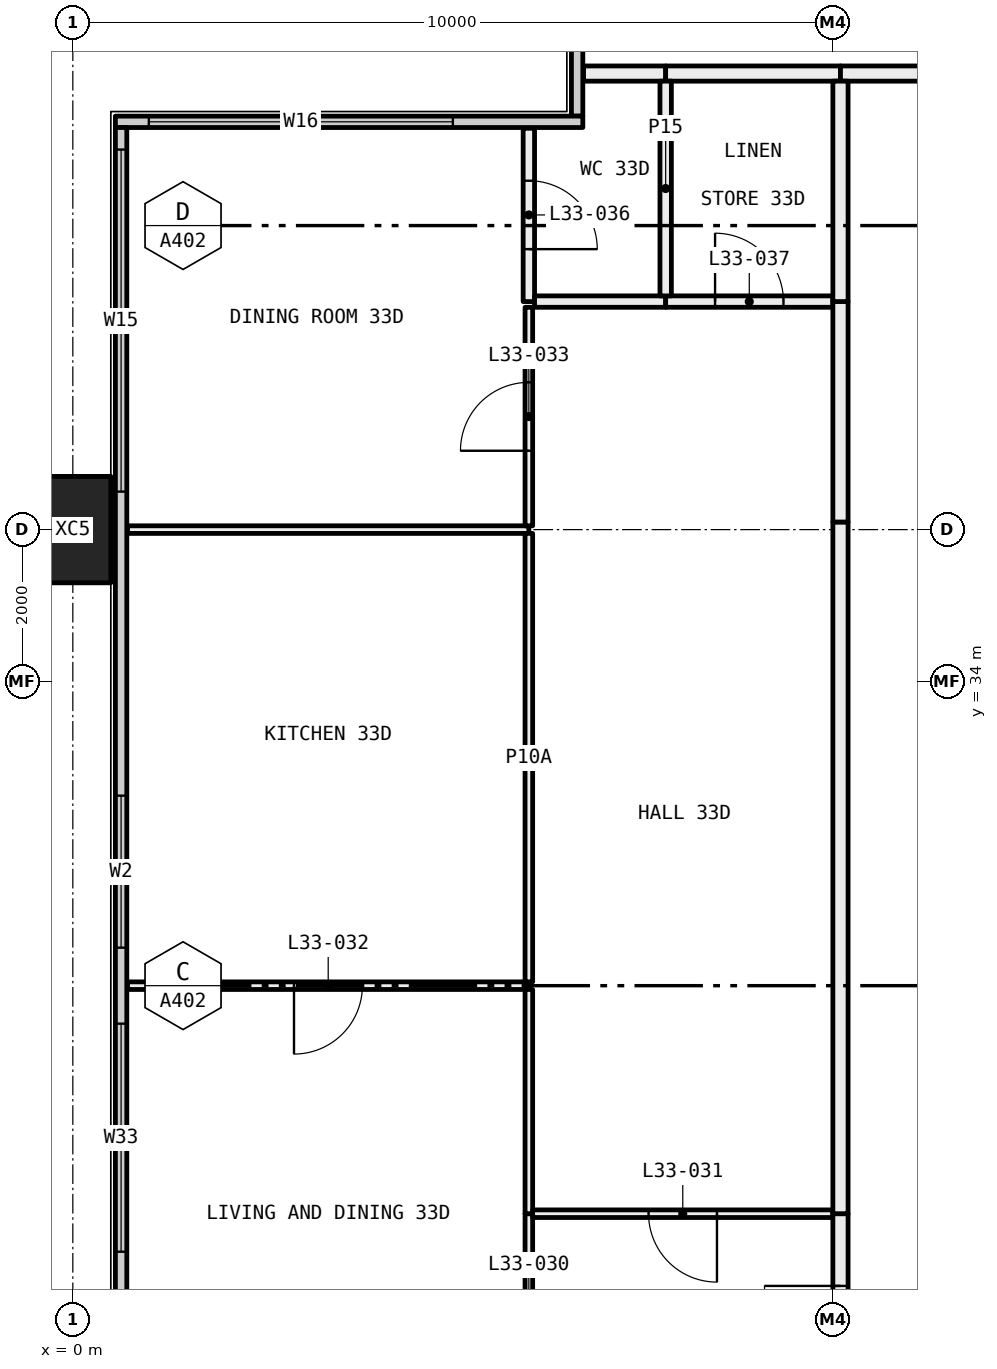
"""IFC4 building model, lengths in metres.
Left out: names, types, materials, properties, quantities, classifications, styles, units other than length and angle.
Written with IfcOpenShell. Run it as: python <this file> out.ifc"""

import sys

from ifc_helpers import new_model, si_unit, direction, frame, frame_2d, origin, origin_2d, place, context, subcontext, project, spatial, rectangle, hollow_rectangle, extrude, element, fill, save


model = new_model("IFC4")
c1 = context("Model", 3, precision=1e-05, world=origin(), true_north=direction((0.0, 1.0)))
c2 = subcontext(c1, "Body", "Model", "MODEL_VIEW")
j1 = project(units=[si_unit("LENGTHUNIT", "METRE"), si_unit("PLANEANGLEUNIT", "RADIAN")], contexts=[c1])
p1 = place(None, origin())
s1 = spatial("IfcSite", under=j1, at=p1, CompositionType="ELEMENT")
p2 = place(p1, origin())
s2 = spatial("IfcBuilding", under=s1, at=p2, CompositionType="ELEMENT")
p3 = place(p2, frame((0.0, 0.0, 127.65)))
s3 = spatial("IfcBuildingStorey", under=s2, at=p3, CompositionType="ELEMENT", Elevation=127.65)
p4 = place(p3, frame((0.0, 36.0, -0.4), z_axis=(0.0, 0.0, 1.0), x_axis=(0.0, 1.0, 0.0)))
e1 = element("IfcColumn", 1, at=p4, inside=s3, PredefinedType="COLUMN", context=c2, shape_type="SweptSolid", body=[
    extrude(hollow_rectangle(XDim=1.4, YDim=1.0, WallThickness=0.055, at=origin_2d()), origin(), (0.0, 0.0, 1.0), 3.45),
])
p5 = place(p3, frame((6.635, 41.44, 0.0), z_axis=(0.0, 0.0, 1.0), x_axis=(0.0, 1.0, 0.0)))
e2 = element("IfcWall", 2, at=p5, inside=s3, PredefinedType="ELEMENTEDWALL", context=c2, shape_type="SweptSolid", body=[
    extrude(rectangle(XDim=5.85, YDim=0.15, at=frame_2d((2.925, 0.0))), origin(), (0.0, 0.0, 1.0), 3.05),
])
p6 = place(p5, frame((1.56, 0.0, 0.45)))
e3 = element("IfcOpeningElement", 3, at=p6, cuts=e2, PredefinedType="OPENING", context=c2, shape_type="SweptSolid", body=[
    extrude(rectangle(XDim=4.0, YDim=2.55, at=frame_2d((2.0, 1.275))), frame((0.0, 0.085, 0.0), z_axis=(0.0, -1.0, 0.0), x_axis=(1.0, 0.0, 0.0)), (0.0, 0.0, 1.0), 0.17),
])
p7 = place(p3, frame((0.56, 41.365, 0.0), z_axis=(0.0, 0.0, 1.0), x_axis=(1.0, 0.0, 0.0)))
e4 = element("IfcWall", 4, at=p7, inside=s3, PredefinedType="ELEMENTEDWALL", context=c2, shape_type="SweptSolid", body=[
    extrude(rectangle(XDim=6.15, YDim=0.15, at=frame_2d((3.075, 0.0))), origin(), (0.0, 0.0, 1.0), 3.05),
])
p8 = place(p7, frame((0.44, 0.0, 0.45)))
e5 = element("IfcOpeningElement", 5, at=p8, cuts=e4, PredefinedType="OPENING", context=c2, shape_type="SweptSolid", body=[
    extrude(rectangle(XDim=4.0, YDim=2.55, at=frame_2d((2.0, 1.275))), frame((0.0, 0.085, 0.0), z_axis=(0.0, -1.0, 0.0), x_axis=(1.0, 0.0, 0.0)), (0.0, 0.0, 1.0), 0.17),
])
p9 = place(p3, frame((0.635, 18.71, 0.0), z_axis=(0.0, 0.0, 1.0), x_axis=(0.0, 1.0, 0.0)))
e6 = element("IfcWall", 6, at=p9, inside=s3, PredefinedType="ELEMENTEDWALL", context=c2, shape_type="SweptSolid", body=[
    extrude(rectangle(XDim=22.58, YDim=0.15, at=frame_2d((11.29, 0.0))), origin(), (0.0, 0.0, 1.0), 3.05),
])
p10 = place(p9, frame((0.29, 0.0, 0.45)))
e7 = element("IfcOpeningElement", 7, at=p10, cuts=e6, PredefinedType="OPENING", context=c2, shape_type="SweptSolid", body=[
    extrude(rectangle(XDim=4.5, YDim=2.55, at=frame_2d((2.25, 1.275))), frame((0.0, 0.085, 0.0), z_axis=(0.0, -1.0, 0.0), x_axis=(1.0, 0.0, 0.0)), (0.0, 0.0, 1.0), 0.17),
])
p11 = place(p9, frame((7.79, 0.0, 0.45)))
e8 = element("IfcOpeningElement", 8, at=p11, cuts=e6, PredefinedType="OPENING", context=c2, shape_type="SweptSolid", body=[
    extrude(rectangle(XDim=3.0, YDim=2.55, at=frame_2d((1.5, 1.275))), frame((0.0, 0.085, 0.0), z_axis=(0.0, -1.0, 0.0), x_axis=(1.0, 0.0, 0.0)), (0.0, 0.0, 1.0), 0.17),
])
p12 = place(p9, frame((11.79, 0.0, 0.45)))
e9 = element("IfcOpeningElement", 9, at=p12, cuts=e6, PredefinedType="OPENING", context=c2, shape_type="SweptSolid", body=[
    extrude(rectangle(XDim=2.0, YDim=2.55, at=frame_2d((1.0, 1.275))), frame((0.0, 0.085, 0.0), z_axis=(0.0, -1.0, 0.0), x_axis=(1.0, 0.0, 0.0)), (0.0, 0.0, 1.0), 0.17),
])
p13 = place(p9, frame((17.79, 0.0, 0.45)))
e10 = element("IfcOpeningElement", 10, at=p13, cuts=e6, PredefinedType="OPENING", context=c2, shape_type="SweptSolid", body=[
    extrude(rectangle(XDim=4.5, YDim=2.55, at=frame_2d((2.25, 1.275))), frame((0.0, 0.085, 0.0), z_axis=(0.0, -1.0, 0.0), x_axis=(1.0, 0.0, 0.0)), (0.0, 0.0, 1.0), 0.17),
])
p14 = place(p3, frame((6.72, 42.0, 0.0), z_axis=(0.0, 0.0, 1.0), x_axis=(1.0, 0.0, 0.0)))
e11 = element("IfcWall", 11, at=p14, inside=s3, PredefinedType="PARTITIONING", context=c2, shape_type="SweptSolid", body=[
    extrude(rectangle(XDim=1.08, YDim=0.2, at=frame_2d((0.54, 0.0))), origin(), (0.0, 0.0, 1.0), 3.05),
])
p15 = place(p3, frame((7.8, 42.0, 0.0), z_axis=(0.0, 0.0, 1.0), x_axis=(1.0, 0.0, 0.0)))
e12 = element("IfcWall", 12, at=p15, inside=s3, PredefinedType="PARTITIONING", context=c2, shape_type="SweptSolid", body=[
    extrude(rectangle(XDim=2.3, YDim=0.2, at=frame_2d((1.15, 0.0))), origin(), (0.0, 0.0, 1.0), 3.05),
])
p16 = place(p3, frame((10.1, 42.0, 0.0), z_axis=(0.0, 0.0, 1.0), x_axis=(1.0, 0.0, 0.0)))
e13 = element("IfcWall", 13, at=p16, inside=s3, PredefinedType="PARTITIONING", context=c2, shape_type="SweptSolid", body=[
    extrude(rectangle(XDim=1.9, YDim=0.2, at=frame_2d((0.95, 0.0))), origin(), (0.0, 0.0, 1.0), 3.05),
])
p17 = place(p3, frame((6.0, 30.0, 0.0), z_axis=(0.0, 0.0, 1.0), x_axis=(-1.0, 0.0, 0.0)))
e14 = element("IfcWall", 14, at=p17, inside=s3, PredefinedType="PARTITIONING", context=c2, shape_type="SweptSolid", body=[
    extrude(rectangle(XDim=5.28, YDim=0.1, at=frame_2d((2.64, 0.0))), origin(), (0.0, 0.0, 1.0), 3.05),
])
p18 = place(p17, frame((2.19, 0.0, 0.0)))
e15 = element("IfcOpeningElement", 15, at=p18, cuts=e14, PredefinedType="OPENING", context=c2, shape_type="SweptSolid", body=[
    extrude(rectangle(XDim=0.9, YDim=2.1, at=frame_2d((0.45, 1.05))), frame((0.0, 0.06, 0.0), z_axis=(0.0, -1.0, 0.0), x_axis=(1.0, 0.0, 0.0)), (0.0, 0.0, 1.0), 0.12),
])
p19 = place(p3, frame((6.0, 24.05, 0.0), z_axis=(0.0, 0.0, 1.0), x_axis=(0.0, 1.0, 0.0)))
e16 = element("IfcWall", 16, at=p19, inside=s3, PredefinedType="PARTITIONING", context=c2, shape_type="SweptSolid", body=[
    extrude(rectangle(XDim=2.95, YDim=0.1, at=frame_2d((1.475, 0.0))), origin(), (0.0, 0.0, 1.0), 2.45),
])
p20 = place(p19, frame((1.025, 0.0, 0.0)))
e17 = element("IfcOpeningElement", 17, at=p20, cuts=e16, PredefinedType="OPENING", context=c2, shape_type="SweptSolid", body=[
    extrude(rectangle(XDim=0.9, YDim=2.1, at=frame_2d((0.45, 1.05))), frame((0.0, 0.06, 0.0), z_axis=(0.0, -1.0, 0.0), x_axis=(1.0, 0.0, 0.0)), (0.0, 0.0, 1.0), 0.12),
])
p21 = place(p3, frame((6.0, 27.0, 0.0), z_axis=(0.0, 0.0, 1.0), x_axis=(0.0, 1.0, 0.0)))
e18 = element("IfcWall", 18, at=p21, inside=s3, PredefinedType="PARTITIONING", context=c2, shape_type="SweptSolid", body=[
    extrude(rectangle(XDim=2.95, YDim=0.1, at=frame_2d((1.475, 0.0))), origin(), (0.0, 0.0, 1.0), 3.05),
])
p22 = place(p3, frame((6.0, 36.0, 0.0), z_axis=(0.0, 0.0, 1.0), x_axis=(-1.0, 0.0, 0.0)))
e19 = element("IfcWall", 19, at=p22, inside=s3, PredefinedType="PARTITIONING", context=c2, shape_type="SweptSolid", body=[
    extrude(rectangle(XDim=5.28, YDim=0.1, at=frame_2d((2.64, 0.0))), origin(), (0.0, 0.0, 1.0), 2.45),
])
p23 = place(p3, frame((6.0, 30.05, 0.0), z_axis=(0.0, 0.0, 1.0), x_axis=(0.0, 1.0, 0.0)))
e20 = element("IfcWall", 20, at=p23, inside=s3, PredefinedType="PARTITIONING", context=c2, shape_type="SweptSolid", body=[
    extrude(rectangle(XDim=5.9, YDim=0.1, at=frame_2d((2.95, 0.0))), origin(), (0.0, 0.0, 1.0), 2.45),
])
p24 = place(p3, frame((6.0, 36.05, 0.0), z_axis=(0.0, 0.0, 1.0), x_axis=(0.0, 1.0, 0.0)))
e21 = element("IfcWall", 21, at=p24, inside=s3, PredefinedType="PARTITIONING", context=c2, shape_type="SweptSolid", body=[
    extrude(rectangle(XDim=2.875, YDim=0.1, at=frame_2d((1.438, 0.0))), origin(), (0.0, 0.0, 1.0), 2.45),
])
p25 = place(p24, frame((0.988, 0.0, 0.0)))
e22 = element("IfcOpeningElement", 22, at=p25, cuts=e21, PredefinedType="OPENING", context=c2, shape_type="SweptSolid", body=[
    extrude(rectangle(XDim=0.9, YDim=2.1, at=frame_2d((0.45, 1.05))), frame((0.0, 0.06, 0.0), z_axis=(0.0, -1.0, 0.0), x_axis=(1.0, 0.0, 0.0)), (0.0, 0.0, 1.0), 0.12),
])
p26 = place(p3, frame((6.0, 39.0, 0.0), z_axis=(0.0, 0.0, 1.0), x_axis=(0.0, 1.0, 0.0)))
e23 = element("IfcWall", 23, at=p26, inside=s3, PredefinedType="PARTITIONING", context=c2, shape_type="SweptSolid", body=[
    extrude(rectangle(XDim=2.28, YDim=0.15, at=frame_2d((1.14, 0.0))), origin(), (0.0, 0.0, 1.0), 3.05),
])
p27 = place(p26, frame((0.69, 0.0, 0.0)))
e24 = element("IfcOpeningElement", 24, at=p27, cuts=e23, PredefinedType="OPENING", context=c2, shape_type="SweptSolid", body=[
    extrude(rectangle(XDim=0.9, YDim=2.1, at=frame_2d((0.45, 1.05))), frame((0.0, 0.085, 0.0), z_axis=(0.0, -1.0, 0.0), x_axis=(1.0, 0.0, 0.0)), (0.0, 0.0, 1.0), 0.17),
])
p28 = place(p3, frame((10.0, 27.0, 0.0), z_axis=(0.0, 0.0, 1.0), x_axis=(-1.0, 0.0, 0.0)))
e25 = element("IfcWall", 25, at=p28, inside=s3, PredefinedType="PARTITIONING", context=c2, shape_type="SweptSolid", body=[
    extrude(rectangle(XDim=3.95, YDim=0.1, at=frame_2d((1.975, 0.0))), origin(), (0.0, 0.0, 1.0), 3.05),
])
p29 = place(p28, frame((1.525, 0.0, 0.0)))
e26 = element("IfcOpeningElement", 26, at=p29, cuts=e25, PredefinedType="OPENING", context=c2, shape_type="SweptSolid", body=[
    extrude(rectangle(XDim=0.9, YDim=2.1, at=frame_2d((0.45, 1.05))), frame((0.0, 0.06, 0.0), z_axis=(0.0, -1.0, 0.0), x_axis=(1.0, 0.0, 0.0)), (0.0, 0.0, 1.0), 0.12),
])
p30 = place(p3, frame((10.1, 24.1, 0.0), z_axis=(0.0, 0.0, 1.0), x_axis=(0.0, 1.0, 0.0)))
e27 = element("IfcWall", 27, at=p30, inside=s3, PredefinedType="PARTITIONING", context=c2, shape_type="SweptSolid", body=[
    extrude(rectangle(XDim=2.9, YDim=0.2, at=frame_2d((1.45, 0.0))), origin(), (0.0, 0.0, 1.0), 3.05),
])
p31 = place(p30, frame((0.95, 0.0, 0.0)))
e28 = element("IfcOpeningElement", 28, at=p31, cuts=e27, PredefinedType="OPENING", context=c2, shape_type="SweptSolid", body=[
    extrude(rectangle(XDim=1.0, YDim=2.1, at=frame_2d((0.5, 1.05))), frame((0.0, 0.11, 0.0), z_axis=(0.0, -1.0, 0.0), x_axis=(1.0, 0.0, 0.0)), (0.0, 0.0, 1.0), 0.22),
])
p32 = place(p3, frame((7.8, 39.0, 0.0), z_axis=(0.0, 0.0, 1.0), x_axis=(-1.0, 0.0, 0.0)))
e29 = element("IfcWall", 29, at=p32, inside=s3, PredefinedType="PARTITIONING", context=c2, shape_type="SweptSolid", body=[
    extrude(rectangle(XDim=1.725, YDim=0.15, at=frame_2d((0.863, 0.0))), origin(), (0.0, 0.0, 1.0), 3.05),
])
p33 = place(p3, frame((10.0, 39.0, 0.0), z_axis=(0.0, 0.0, 1.0), x_axis=(-1.0, 0.0, 0.0)))
e30 = element("IfcWall", 30, at=p33, inside=s3, PredefinedType="PARTITIONING", context=c2, shape_type="SweptSolid", body=[
    extrude(rectangle(XDim=2.2, YDim=0.15, at=frame_2d((1.1, 0.0))), origin(), (0.0, 0.0, 1.0), 3.05),
])
p34 = place(p33, frame((0.65, 0.0, 0.0)))
e31 = element("IfcOpeningElement", 31, at=p34, cuts=e30, PredefinedType="OPENING", context=c2, shape_type="SweptSolid", body=[
    extrude(rectangle(XDim=0.9, YDim=2.1, at=frame_2d((0.45, 1.05))), frame((0.0, 0.085, 0.0), z_axis=(0.0, -1.0, 0.0), x_axis=(1.0, 0.0, 0.0)), (0.0, 0.0, 1.0), 0.17),
])
p35 = place(p3, frame((10.1, 27.0, 0.0), z_axis=(0.0, 0.0, 1.0), x_axis=(0.0, 1.0, 0.0)))
e32 = element("IfcWall", 32, at=p35, inside=s3, PredefinedType="PARTITIONING", context=c2, shape_type="SweptSolid", body=[
    extrude(rectangle(XDim=9.1, YDim=0.2, at=frame_2d((4.55, 0.0))), origin(), (0.0, 0.0, 1.0), 2.45),
])
p36 = place(p3, frame((10.1, 36.1, 0.0), z_axis=(0.0, 0.0, 1.0), x_axis=(0.0, 1.0, 0.0)))
e33 = element("IfcWall", 33, at=p36, inside=s3, PredefinedType="PARTITIONING", context=c2, shape_type="SweptSolid", body=[
    extrude(rectangle(XDim=2.9, YDim=0.2, at=frame_2d((1.45, 0.0))), origin(), (0.0, 0.0, 1.0), 3.05),
])
p37 = place(p3, frame((7.8, 39.075, 0.0), z_axis=(0.0, 0.0, 1.0), x_axis=(0.0, 1.0, 0.0)))
e34 = element("IfcWall", 34, at=p37, inside=s3, PredefinedType="PARTITIONING", context=c2, shape_type="SweptSolid", body=[
    extrude(rectangle(XDim=2.825, YDim=0.15, at=frame_2d((1.413, 0.0))), origin(), (0.0, 0.0, 1.0), 3.05),
])
p38 = place(p3, frame((10.1, 39.0, 0.0), z_axis=(0.0, 0.0, 1.0), x_axis=(0.0, 1.0, 0.0)))
e35 = element("IfcWall", 35, at=p38, inside=s3, PredefinedType="PARTITIONING", context=c2, shape_type="SweptSolid", body=[
    extrude(rectangle(XDim=2.9, YDim=0.2, at=frame_2d((1.45, 0.0))), origin(), (0.0, 0.0, 1.0), 3.05),
])
p39 = place(p8, origin())
e36 = element("IfcWindow", 36, at=p39, inside=s3, PartitioningType="SINGLE_PANEL", PredefinedType="WINDOW", context=c2, shape_type="SweptSolid", body=[
    extrude(rectangle(XDim=4.0, YDim=2.55, at=frame_2d((2.0, 1.275))), frame((0.0, 0.03, 0.0), z_axis=(0.0, -1.0, 0.0), x_axis=(1.0, 0.0, 0.0)), (0.0, 0.0, 1.0), 0.06),
])
fill(e5, e36)
p40 = place(p11, origin())
e37 = element("IfcWindow", 37, at=p40, inside=s3, PartitioningType="SINGLE_PANEL", PredefinedType="WINDOW", context=c2, shape_type="SweptSolid", body=[
    extrude(rectangle(XDim=3.0, YDim=2.55, at=frame_2d((1.5, 1.275))), frame((0.0, 0.03, 0.0), z_axis=(0.0, -1.0, 0.0), x_axis=(1.0, 0.0, 0.0)), (0.0, 0.0, 1.0), 0.06),
])
fill(e8, e37)
p41 = place(p12, origin())
e38 = element("IfcWindow", 38, at=p41, inside=s3, PartitioningType="SINGLE_PANEL", PredefinedType="WINDOW", context=c2, shape_type="SweptSolid", body=[
    extrude(rectangle(XDim=2.0, YDim=2.55, at=frame_2d((1.0, 1.275))), frame((0.0, 0.03, 0.0), z_axis=(0.0, -1.0, 0.0), x_axis=(1.0, 0.0, 0.0)), (0.0, 0.0, 1.0), 0.06),
])
fill(e9, e38)
p42 = place(p13, origin())
e39 = element("IfcWindow", 39, at=p42, inside=s3, PartitioningType="SINGLE_PANEL", PredefinedType="WINDOW", context=c2, shape_type="SweptSolid", body=[
    extrude(rectangle(XDim=4.5, YDim=2.55, at=frame_2d((2.25, 1.275))), frame((0.0, 0.03, 0.0), z_axis=(0.0, -1.0, 0.0), x_axis=(1.0, 0.0, 0.0)), (0.0, 0.0, 1.0), 0.06),
])
fill(e10, e39)
p43 = place(p31, origin())
e40 = element("IfcDoor", 40, at=p43, inside=s3, OperationType="SINGLE_SWING_LEFT", PredefinedType="DOOR", context=c2, shape_type="SweptSolid", body=[
    extrude(rectangle(XDim=1.0, YDim=2.1, at=frame_2d((0.5, 1.05))), frame((0.0, 0.025, 0.0), z_axis=(0.0, -1.0, 0.0), x_axis=(1.0, 0.0, 0.0)), (0.0, 0.0, 1.0), 0.05),
])
fill(e28, e40)
p44 = place(p29, origin())
e41 = element("IfcDoor", 41, at=p44, inside=s3, OperationType="SINGLE_SWING_RIGHT", PredefinedType="DOOR", context=c2, shape_type="SweptSolid", body=[
    extrude(rectangle(XDim=0.9, YDim=2.1, at=frame_2d((0.45, 1.05))), frame((0.0, 0.025, 0.0), z_axis=(0.0, -1.0, 0.0), x_axis=(1.0, 0.0, 0.0)), (0.0, 0.0, 1.0), 0.05),
])
fill(e26, e41)
p45 = place(p18, origin())
e42 = element("IfcDoor", 42, at=p45, inside=s3, OperationType="SINGLE_SWING_LEFT", PredefinedType="DOOR", context=c2, shape_type="SweptSolid", body=[
    extrude(rectangle(XDim=0.9, YDim=2.1, at=frame_2d((0.45, 1.05))), frame((0.0, 0.025, 0.0), z_axis=(0.0, -1.0, 0.0), x_axis=(1.0, 0.0, 0.0)), (0.0, 0.0, 1.0), 0.05),
])
fill(e15, e42)
p46 = place(p25, origin())
e43 = element("IfcDoor", 43, at=p46, inside=s3, OperationType="SINGLE_SWING_RIGHT", PredefinedType="DOOR", context=c2, shape_type="SweptSolid", body=[
    extrude(rectangle(XDim=0.9, YDim=2.1, at=frame_2d((0.45, 1.05))), frame((0.0, 0.025, 0.0), z_axis=(0.0, -1.0, 0.0), x_axis=(1.0, 0.0, 0.0)), (0.0, 0.0, 1.0), 0.05),
])
fill(e22, e43)
p47 = place(p27, frame((0.9, 0.0, 0.0), x_axis=(-1.0, 0.0, 0.0)))
e44 = element("IfcDoor", 44, at=p47, inside=s3, OperationType="SINGLE_SWING_LEFT", PredefinedType="DOOR", context=c2, shape_type="SweptSolid", body=[
    extrude(rectangle(XDim=0.9, YDim=2.1, at=frame_2d((0.45, 1.05))), frame((0.0, 0.025, 0.0), z_axis=(0.0, -1.0, 0.0), x_axis=(1.0, 0.0, 0.0)), (0.0, 0.0, 1.0), 0.05),
])
fill(e24, e44)
p48 = place(p34, frame((0.9, 0.0, 0.0), x_axis=(-1.0, 0.0, 0.0)))
e45 = element("IfcDoor", 45, at=p48, inside=s3, OperationType="SINGLE_SWING_RIGHT", PredefinedType="DOOR", context=c2, shape_type="SweptSolid", body=[
    extrude(rectangle(XDim=0.9, YDim=2.1, at=frame_2d((0.45, 1.05))), frame((0.0, 0.025, 0.0), z_axis=(0.0, -1.0, 0.0), x_axis=(1.0, 0.0, 0.0)), (0.0, 0.0, 1.0), 0.05),
])
fill(e31, e45)
save(model, sys.argv[1])
